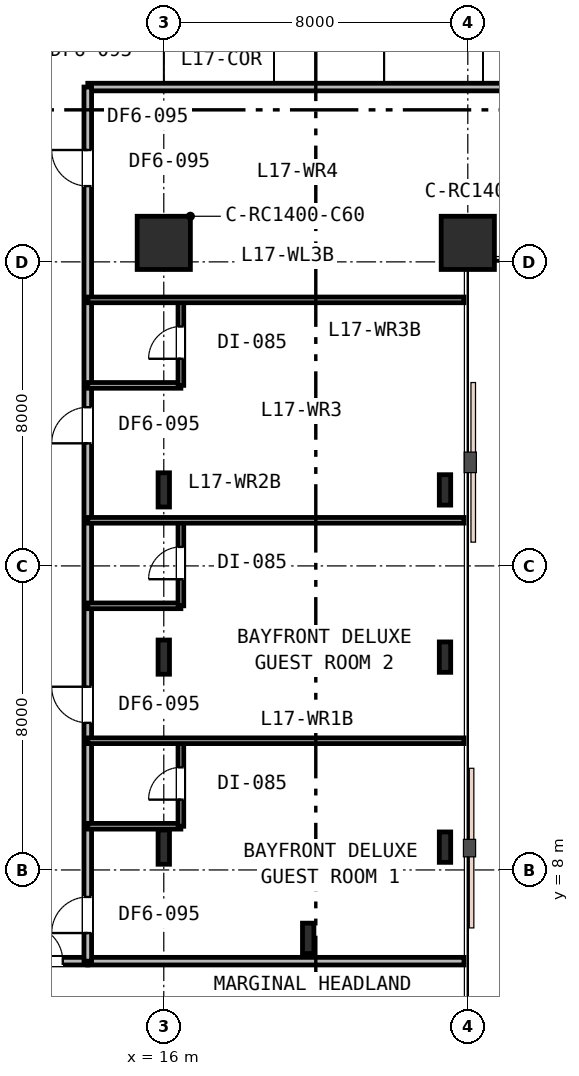
"""IFC4 building model, lengths in metres.
Left out: names, types, materials, properties, quantities, classifications, styles, units other than length and angle.
Written with IfcOpenShell. Run it as: python <this file> out.ifc"""

import sys

from ifc_helpers import new_model, si_unit, direction, frame, frame_2d, origin, origin_2d, place, context, subcontext, project, spatial, rectangle, i_section, extrude, element, fill, save


model = new_model("IFC4")
c1 = context("Model", 3, precision=1e-05, world=origin(), true_north=direction((0.0, 1.0)))
c2 = subcontext(c1, "Body", "Model", "MODEL_VIEW")
j1 = project(units=[si_unit("LENGTHUNIT", "METRE"), si_unit("PLANEANGLEUNIT", "RADIAN")], contexts=[c1])
p1 = place(None, origin())
s1 = spatial("IfcSite", under=j1, at=p1, CompositionType="ELEMENT")
p2 = place(p1, origin())
s2 = spatial("IfcBuilding", under=s1, at=p2, CompositionType="ELEMENT")
p3 = place(p2, frame((0.0, 0.0, 69.0)))
s3 = spatial("IfcBuildingStorey", under=s2, at=p3, CompositionType="ELEMENT", Elevation=69.0)
for number, where, z_axis, x_axis in (
    (1, (16.0, 24.5, 0.0), (0.0, 0.0, 1.0), (1.0, 0.0, 0.0)),
    (2, (24.0, 24.5, 0.0), (0.0, 0.0, 1.0), (1.0, 0.0, 0.0)),
):
    element("IfcColumn", number, at=place(p3, frame(where, z_axis=z_axis, x_axis=x_axis)), inside=s3, PredefinedType="COLUMN", context=c2, shape_type="SweptSolid", body=[
        extrude(rectangle(XDim=1.4, YDim=1.4, at=origin_2d()), origin(), (0.0, 0.0, 1.0), 3.6),
    ])
for number, where, z_axis, x_axis in (
    (3, (19.8, 6.2, 0.0), (0.0, 0.0, 1.0), (1.0, 0.0, 0.0)),
    (4, (23.4, 8.6, 0.0), (0.0, 0.0, 1.0), (1.0, 0.0, 0.0)),
    (5, (23.4, 13.6, 0.0), (0.0, 0.0, 1.0), (1.0, 0.0, 0.0)),
    (6, (23.4, 18.0, 0.0), (0.0, 0.0, 1.0), (1.0, 0.0, 0.0)),
):
    element("IfcColumn", number, at=place(p3, frame(where, z_axis=z_axis, x_axis=x_axis)), inside=s3, PredefinedType="COLUMN", context=c2, shape_type="SweptSolid", body=[
        extrude(i_section(OverallWidth=0.3, OverallDepth=0.8, WebThickness=0.018, FlangeThickness=0.033, FilletRadius=0.03, at=origin_2d()), origin(), (0.0, 0.0, 1.0), 3.6),
    ])
for number, where, z_axis, x_axis in (
    (7, (16.0, 8.6, 0.0), (0.0, 0.0, 1.0), (1.0, 0.0, 0.0)),
    (8, (16.0, 13.6, 0.0), (0.0, 0.0, 1.0), (1.0, 0.0, 0.0)),
    (9, (16.0, 18.0, 0.0), (0.0, 0.0, 1.0), (1.0, 0.0, 0.0)),
):
    element("IfcColumn", number, at=place(p3, frame(where, z_axis=z_axis, x_axis=x_axis)), inside=s3, PredefinedType="COLUMN", context=c2, shape_type="SweptSolid", body=[
        extrude(i_section(OverallWidth=0.3, OverallDepth=0.9, WebThickness=0.018, FlangeThickness=0.035, FilletRadius=0.03, at=origin_2d()), origin(), (0.0, 0.0, 1.0), 3.6),
    ])
p4 = place(p3, frame((14.0, 28.6, 0.0), z_axis=(0.0, 0.0, 1.0), x_axis=(1.0, 0.0, 0.0)))
e10 = element("IfcWall", 10, at=p4, inside=s3, PredefinedType="PARTITIONING", context=c2, shape_type="SweptSolid", body=[
    extrude(rectangle(XDim=36.4, YDim=0.2, at=frame_2d((18.2, 0.0))), origin(), (0.0, 0.0, 1.0), 2.83),
])
p5 = place(p4, frame((15.475, 0.0, 0.0)))
e11 = element("IfcOpeningElement", 11, at=p5, cuts=e10, PredefinedType="OPENING", context=c2, shape_type="SweptSolid", body=[
    extrude(rectangle(XDim=0.95, YDim=2.15, at=frame_2d((0.475, 1.075))), frame((0.0, 0.11, 0.0), z_axis=(0.0, -1.0, 0.0), x_axis=(1.0, 0.0, 0.0)), (0.0, 0.0, 1.0), 0.22),
])
p6 = place(p4, frame((27.986, 0.0, 0.0)))
e12 = element("IfcOpeningElement", 12, at=p6, cuts=e10, PredefinedType="OPENING", context=c2, shape_type="SweptSolid", body=[
    extrude(rectangle(XDim=0.95, YDim=2.15, at=frame_2d((0.475, 1.075))), frame((0.0, 0.11, 0.0), z_axis=(0.0, -1.0, 0.0), x_axis=(1.0, 0.0, 0.0)), (0.0, 0.0, 1.0), 0.22),
])
p7 = place(p3, frame((14.0, 5.6, 0.0), z_axis=(0.0, 0.0, 1.0), x_axis=(1.0, 0.0, 0.0)))
e13 = element("IfcWall", 13, at=p7, inside=s3, PredefinedType="PARTITIONING", context=c2, shape_type="SweptSolid", body=[
    extrude(rectangle(XDim=9.9, YDim=0.2, at=frame_2d((4.95, 0.0))), origin(), (0.0, 0.0, 1.0), 2.83),
])
p8 = place(p3, frame((11.8, 5.6, 0.0), z_axis=(0.0, 0.0, 1.0), x_axis=(1.0, 0.0, 0.0)))
e14 = element("IfcWall", 14, at=p8, inside=s3, PredefinedType="PARTITIONING", context=c2, shape_type="SweptSolid", body=[
    extrude(rectangle(XDim=2.2, YDim=0.2, at=frame_2d((1.1, 0.0))), origin(), (0.0, 0.0, 1.0), 3.33),
])
p9 = place(p8, frame((0.593, 0.0, 0.0)))
e15 = element("IfcOpeningElement", 15, at=p9, cuts=e14, PredefinedType="OPENING", context=c2, shape_type="SweptSolid", body=[
    extrude(rectangle(XDim=0.95, YDim=2.15, at=frame_2d((0.475, 1.075))), frame((0.0, 0.11, 0.0), z_axis=(0.0, -1.0, 0.0), x_axis=(1.0, 0.0, 0.0)), (0.0, 0.0, 1.0), 0.22),
])
p10 = place(p3, frame((14.0, 5.6, 0.0), z_axis=(0.0, 0.0, 1.0), x_axis=(0.0, 1.0, 0.0)))
e16 = element("IfcWall", 16, at=p10, inside=s3, PredefinedType="PARTITIONING", context=c2, shape_type="SweptSolid", body=[
    extrude(rectangle(XDim=23.0, YDim=0.2, at=frame_2d((11.5, 0.0))), origin(), (0.0, 0.0, 1.0), 2.83),
])
p11 = place(p10, frame((0.74, 0.0, 0.0)))
e17 = element("IfcOpeningElement", 17, at=p11, cuts=e16, PredefinedType="OPENING", context=c2, shape_type="SweptSolid", body=[
    extrude(rectangle(XDim=0.95, YDim=2.15, at=frame_2d((0.475, 1.075))), frame((0.0, 0.11, 0.0), z_axis=(0.0, -1.0, 0.0), x_axis=(1.0, 0.0, 0.0)), (0.0, 0.0, 1.0), 0.22),
])
p12 = place(p10, frame((6.271, 0.0, 0.0)))
e18 = element("IfcOpeningElement", 18, at=p12, cuts=e16, PredefinedType="OPENING", context=c2, shape_type="SweptSolid", body=[
    extrude(rectangle(XDim=0.95, YDim=2.15, at=frame_2d((0.475, 1.075))), frame((0.0, 0.11, 0.0), z_axis=(0.0, -1.0, 0.0), x_axis=(1.0, 0.0, 0.0)), (0.0, 0.0, 1.0), 0.22),
])
p13 = place(p10, frame((13.626, 0.0, 0.0)))
e19 = element("IfcOpeningElement", 19, at=p13, cuts=e16, PredefinedType="OPENING", context=c2, shape_type="SweptSolid", body=[
    extrude(rectangle(XDim=0.95, YDim=2.15, at=frame_2d((0.475, 1.075))), frame((0.0, 0.11, 0.0), z_axis=(0.0, -1.0, 0.0), x_axis=(1.0, 0.0, 0.0)), (0.0, 0.0, 1.0), 0.22),
])
p14 = place(p10, frame((20.393, 0.0, 0.0)))
e20 = element("IfcOpeningElement", 20, at=p14, cuts=e16, PredefinedType="OPENING", context=c2, shape_type="SweptSolid", body=[
    extrude(rectangle(XDim=0.95, YDim=2.15, at=frame_2d((0.475, 1.075))), frame((0.0, 0.11, 0.0), z_axis=(0.0, -1.0, 0.0), x_axis=(1.0, 0.0, 0.0)), (0.0, 0.0, 1.0), 0.22),
])
p15 = place(p3, frame((14.0, 9.15, 0.0), z_axis=(0.0, 0.0, 1.0), x_axis=(1.0, 0.0, 0.0)))
e21 = element("IfcWall", 21, at=p15, inside=s3, PredefinedType="PARTITIONING", context=c2, shape_type="SweptSolid", body=[
    extrude(rectangle(XDim=2.45, YDim=0.15, at=frame_2d((1.225, 0.0))), origin(), (0.0, 0.0, 1.0), 2.83),
])
p16 = place(p3, frame((16.45, 9.15, 0.0), z_axis=(0.0, 0.0, 1.0), x_axis=(0.0, 1.0, 0.0)))
e22 = element("IfcWall", 22, at=p16, inside=s3, PredefinedType="PARTITIONING", context=c2, shape_type="SweptSolid", body=[
    extrude(rectangle(XDim=2.25, YDim=0.15, at=frame_2d((1.125, 0.0))), origin(), (0.0, 0.0, 1.0), 2.83),
])
p17 = place(p16, frame((0.7, 0.0, 0.0)))
e23 = element("IfcOpeningElement", 23, at=p17, cuts=e22, PredefinedType="OPENING", context=c2, shape_type="SweptSolid", body=[
    extrude(rectangle(XDim=0.85, YDim=2.15, at=frame_2d((0.425, 1.075))), frame((0.0, 0.085, 0.0), z_axis=(0.0, -1.0, 0.0), x_axis=(1.0, 0.0, 0.0)), (0.0, 0.0, 1.0), 0.17),
])
p18 = place(p3, frame((14.0, 11.4, 0.0), z_axis=(0.0, 0.0, 1.0), x_axis=(1.0, 0.0, 0.0)))
e24 = element("IfcWall", 24, at=p18, inside=s3, PredefinedType="PARTITIONING", context=c2, shape_type="SweptSolid", body=[
    extrude(rectangle(XDim=9.9, YDim=0.15, at=frame_2d((4.95, 0.0))), origin(), (0.0, 0.0, 1.0), 2.83),
])
p19 = place(p3, frame((14.0, 14.95, 0.0), z_axis=(0.0, 0.0, 1.0), x_axis=(1.0, 0.0, 0.0)))
e25 = element("IfcWall", 25, at=p19, inside=s3, PredefinedType="PARTITIONING", context=c2, shape_type="SweptSolid", body=[
    extrude(rectangle(XDim=2.45, YDim=0.15, at=frame_2d((1.225, 0.0))), origin(), (0.0, 0.0, 1.0), 2.83),
])
p20 = place(p3, frame((16.45, 14.95, 0.0), z_axis=(0.0, 0.0, 1.0), x_axis=(0.0, 1.0, 0.0)))
e26 = element("IfcWall", 26, at=p20, inside=s3, PredefinedType="PARTITIONING", context=c2, shape_type="SweptSolid", body=[
    extrude(rectangle(XDim=2.25, YDim=0.15, at=frame_2d((1.125, 0.0))), origin(), (0.0, 0.0, 1.0), 2.83),
])
p21 = place(p20, frame((0.7, 0.0, 0.0)))
e27 = element("IfcOpeningElement", 27, at=p21, cuts=e26, PredefinedType="OPENING", context=c2, shape_type="SweptSolid", body=[
    extrude(rectangle(XDim=0.85, YDim=2.15, at=frame_2d((0.425, 1.075))), frame((0.0, 0.085, 0.0), z_axis=(0.0, -1.0, 0.0), x_axis=(1.0, 0.0, 0.0)), (0.0, 0.0, 1.0), 0.17),
])
p22 = place(p3, frame((14.0, 17.2, 0.0), z_axis=(0.0, 0.0, 1.0), x_axis=(1.0, 0.0, 0.0)))
e28 = element("IfcWall", 28, at=p22, inside=s3, PredefinedType="PARTITIONING", context=c2, shape_type="SweptSolid", body=[
    extrude(rectangle(XDim=9.9, YDim=0.15, at=frame_2d((4.95, 0.0))), origin(), (0.0, 0.0, 1.0), 2.83),
])
p23 = place(p3, frame((14.0, 20.75, 0.0), z_axis=(0.0, 0.0, 1.0), x_axis=(1.0, 0.0, 0.0)))
e29 = element("IfcWall", 29, at=p23, inside=s3, PredefinedType="PARTITIONING", context=c2, shape_type="SweptSolid", body=[
    extrude(rectangle(XDim=2.45, YDim=0.15, at=frame_2d((1.225, 0.0))), origin(), (0.0, 0.0, 1.0), 2.83),
])
p24 = place(p3, frame((16.45, 20.75, 0.0), z_axis=(0.0, 0.0, 1.0), x_axis=(0.0, 1.0, 0.0)))
e30 = element("IfcWall", 30, at=p24, inside=s3, PredefinedType="PARTITIONING", context=c2, shape_type="SweptSolid", body=[
    extrude(rectangle(XDim=2.25, YDim=0.15, at=frame_2d((1.125, 0.0))), origin(), (0.0, 0.0, 1.0), 2.83),
])
p25 = place(p24, frame((0.7, 0.0, 0.0)))
e31 = element("IfcOpeningElement", 31, at=p25, cuts=e30, PredefinedType="OPENING", context=c2, shape_type="SweptSolid", body=[
    extrude(rectangle(XDim=0.85, YDim=2.15, at=frame_2d((0.425, 1.075))), frame((0.0, 0.085, 0.0), z_axis=(0.0, -1.0, 0.0), x_axis=(1.0, 0.0, 0.0)), (0.0, 0.0, 1.0), 0.17),
])
p26 = place(p3, frame((14.0, 23.0, 0.0), z_axis=(0.0, 0.0, 1.0), x_axis=(1.0, 0.0, 0.0)))
e32 = element("IfcWall", 32, at=p26, inside=s3, PredefinedType="PARTITIONING", context=c2, shape_type="SweptSolid", body=[
    extrude(rectangle(XDim=9.9, YDim=0.15, at=frame_2d((4.95, 0.0))), origin(), (0.0, 0.0, 1.0), 2.83),
])
p27 = place(p9, origin())
e33 = element("IfcDoor", 33, at=p27, inside=s3, OperationType="SINGLE_SWING_LEFT", PredefinedType="DOOR", context=c2, shape_type="SweptSolid", body=[
    extrude(rectangle(XDim=0.95, YDim=2.15, at=frame_2d((0.475, 1.075))), frame((0.0, 0.025, 0.0), z_axis=(0.0, -1.0, 0.0), x_axis=(1.0, 0.0, 0.0)), (0.0, 0.0, 1.0), 0.05),
])
fill(e15, e33)
p28 = place(p11, origin())
e34 = element("IfcDoor", 34, at=p28, inside=s3, OperationType="SINGLE_SWING_LEFT", PredefinedType="DOOR", context=c2, shape_type="SweptSolid", body=[
    extrude(rectangle(XDim=0.95, YDim=2.15, at=frame_2d((0.475, 1.075))), frame((0.0, 0.025, 0.0), z_axis=(0.0, -1.0, 0.0), x_axis=(1.0, 0.0, 0.0)), (0.0, 0.0, 1.0), 0.05),
])
fill(e17, e34)
p29 = place(p17, origin())
e35 = element("IfcDoor", 35, at=p29, inside=s3, OperationType="SINGLE_SWING_LEFT", PredefinedType="DOOR", context=c2, shape_type="SweptSolid", body=[
    extrude(rectangle(XDim=0.85, YDim=2.15, at=frame_2d((0.425, 1.075))), frame((0.0, 0.025, 0.0), z_axis=(0.0, -1.0, 0.0), x_axis=(1.0, 0.0, 0.0)), (0.0, 0.0, 1.0), 0.05),
])
fill(e23, e35)
p30 = place(p12, origin())
e36 = element("IfcDoor", 36, at=p30, inside=s3, OperationType="SINGLE_SWING_RIGHT", PredefinedType="DOOR", context=c2, shape_type="SweptSolid", body=[
    extrude(rectangle(XDim=0.95, YDim=2.15, at=frame_2d((0.475, 1.075))), frame((0.0, 0.025, 0.0), z_axis=(0.0, -1.0, 0.0), x_axis=(1.0, 0.0, 0.0)), (0.0, 0.0, 1.0), 0.05),
])
fill(e18, e36)
p31 = place(p21, origin())
e37 = element("IfcDoor", 37, at=p31, inside=s3, OperationType="SINGLE_SWING_LEFT", PredefinedType="DOOR", context=c2, shape_type="SweptSolid", body=[
    extrude(rectangle(XDim=0.85, YDim=2.15, at=frame_2d((0.425, 1.075))), frame((0.0, 0.025, 0.0), z_axis=(0.0, -1.0, 0.0), x_axis=(1.0, 0.0, 0.0)), (0.0, 0.0, 1.0), 0.05),
])
fill(e27, e37)
p32 = place(p13, origin())
e38 = element("IfcDoor", 38, at=p32, inside=s3, OperationType="SINGLE_SWING_LEFT", PredefinedType="DOOR", context=c2, shape_type="SweptSolid", body=[
    extrude(rectangle(XDim=0.95, YDim=2.15, at=frame_2d((0.475, 1.075))), frame((0.0, 0.025, 0.0), z_axis=(0.0, -1.0, 0.0), x_axis=(1.0, 0.0, 0.0)), (0.0, 0.0, 1.0), 0.05),
])
fill(e19, e38)
p33 = place(p25, origin())
e39 = element("IfcDoor", 39, at=p33, inside=s3, OperationType="SINGLE_SWING_LEFT", PredefinedType="DOOR", context=c2, shape_type="SweptSolid", body=[
    extrude(rectangle(XDim=0.85, YDim=2.15, at=frame_2d((0.425, 1.075))), frame((0.0, 0.025, 0.0), z_axis=(0.0, -1.0, 0.0), x_axis=(1.0, 0.0, 0.0)), (0.0, 0.0, 1.0), 0.05),
])
fill(e31, e39)
p34 = place(p14, origin())
e40 = element("IfcDoor", 40, at=p34, inside=s3, OperationType="SINGLE_SWING_RIGHT", PredefinedType="DOOR", context=c2, shape_type="SweptSolid", body=[
    extrude(rectangle(XDim=0.95, YDim=2.15, at=frame_2d((0.475, 1.075))), frame((0.0, 0.025, 0.0), z_axis=(0.0, -1.0, 0.0), x_axis=(1.0, 0.0, 0.0)), (0.0, 0.0, 1.0), 0.05),
])
fill(e20, e40)
save(model, sys.argv[1])
